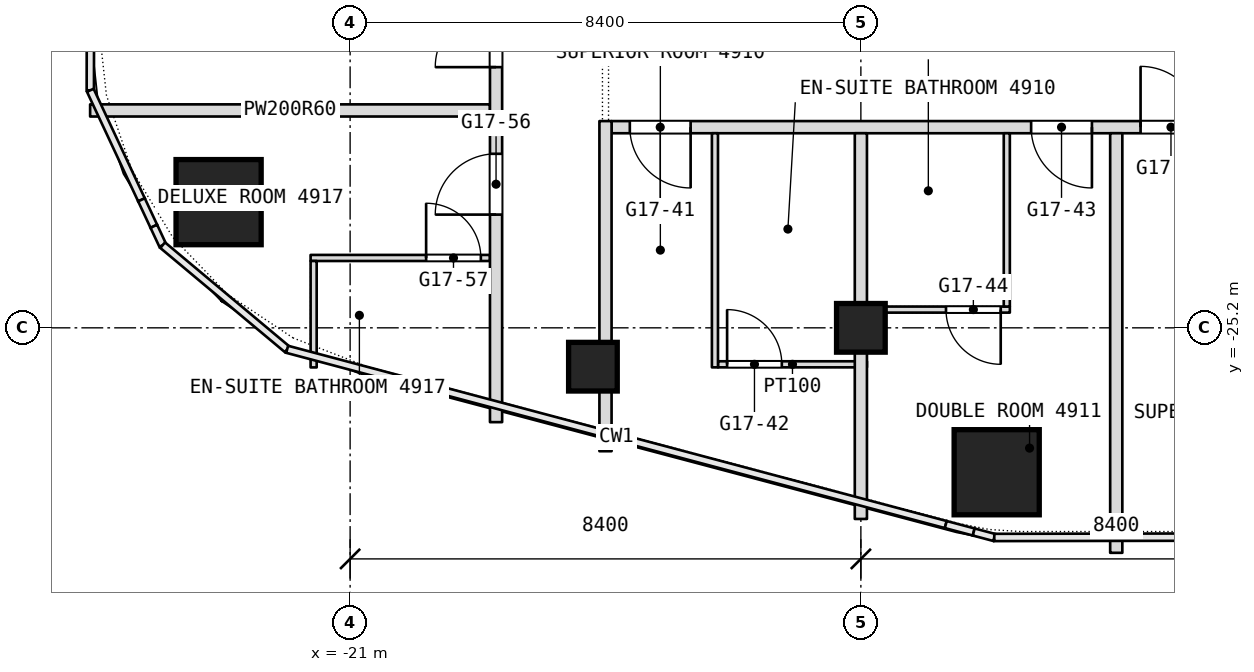
"""IFC4 building model, lengths in metres.
Left out: names, types, materials, properties, quantities, classifications, styles, units other than length and angle.
Written with IfcOpenShell. Run it as: python <this file> out.ifc"""

import sys

from ifc_helpers import new_model, si_unit, direction, frame, frame_2d, origin, origin_2d, place, context, subcontext, project, spatial, rectangle, extrude, element, fill, save


model = new_model("IFC4")
c1 = context("Model", 3, precision=1e-05, world=origin(), true_north=direction((0.0, 1.0)))
c2 = subcontext(c1, "Body", "Model", "MODEL_VIEW")
j1 = project(units=[si_unit("LENGTHUNIT", "METRE"), si_unit("PLANEANGLEUNIT", "RADIAN")], contexts=[c1])
p1 = place(None, origin())
s1 = spatial("IfcSite", under=j1, at=p1, CompositionType="ELEMENT")
p2 = place(p1, origin())
s2 = spatial("IfcBuilding", under=s1, at=p2, CompositionType="ELEMENT")
p3 = place(p2, frame((0.0, 0.0, 212.9)))
s3 = spatial("IfcBuildingStorey", under=s2, at=p3, CompositionType="ELEMENT", Elevation=212.9)
for number, where, z_axis, x_axis in (
    (1, (-23.163, -23.133, 0.0), (0.0, 0.0, 1.0), (1.0, 0.0, 0.0)),
    (2, (-10.366, -27.575, 0.0), (0.0, 0.0, 1.0), (1.0, 0.0, 0.0)),
):
    element("IfcColumn", number, at=place(p3, frame(where, z_axis=z_axis, x_axis=x_axis)), inside=s3, PredefinedType="COLUMN", context=c2, shape_type="SweptSolid", body=[
        extrude(rectangle(XDim=1.4, YDim=1.4, at=origin_2d()), origin(), (0.0, 0.0, 1.0), 3.6),
    ])
for number, where, z_axis, x_axis in (
    (3, (-12.6, -25.2, 0.0), (0.0, 0.0, 1.0), (1.0, 0.0, 0.0)),
    (4, (-17.007, -25.839, 0.0), (0.0, 0.0, 1.0), (1.0, 0.0, 0.0)),
):
    element("IfcColumn", number, at=place(p3, frame(where, z_axis=z_axis, x_axis=x_axis)), inside=s3, PredefinedType="COLUMN", context=c2, shape_type="SweptSolid", body=[
        extrude(rectangle(XDim=0.8, YDim=0.8, at=origin_2d()), origin(), (0.0, 0.0, 1.0), 3.6),
    ])
p4 = place(p3, frame((-14.95, -25.8, 0.0), z_axis=(0.0, 0.0, 1.0), x_axis=(1.0, 0.0, 0.0)))
e5 = element("IfcWall", 5, at=p4, inside=s3, PredefinedType="PARTITIONING", context=c2, shape_type="SweptSolid", body=[
    extrude(rectangle(XDim=2.45, YDim=0.1, at=frame_2d((1.225, 0.0))), origin(), (0.0, 0.0, 1.0), 3.34),
])
p5 = place(p4, frame((0.15, 0.0, 0.0)))
e6 = element("IfcOpeningElement", 6, at=p5, cuts=e5, PredefinedType="OPENING", context=c2, shape_type="SweptSolid", body=[
    extrude(rectangle(XDim=0.9, YDim=2.1, at=frame_2d((0.45, 1.05))), frame((0.0, 0.05, 0.0), z_axis=(0.0, -1.0, 0.0), x_axis=(1.0, 0.0, 0.0)), (0.0, 0.0, 1.0), 0.1),
])
p6 = place(p3, frame((-12.5, -24.9, 0.0), z_axis=(0.0, 0.0, 1.0), x_axis=(1.0, 0.0, 0.0)))
e7 = element("IfcWall", 7, at=p6, inside=s3, PredefinedType="PARTITIONING", context=c2, shape_type="SweptSolid", body=[
    extrude(rectangle(XDim=2.35, YDim=0.1, at=frame_2d((1.175, 0.0))), origin(), (0.0, 0.0, 1.0), 3.34),
])
p7 = place(p6, frame((1.3, 0.0, 0.0)))
e8 = element("IfcOpeningElement", 8, at=p7, cuts=e7, PredefinedType="OPENING", context=c2, shape_type="SweptSolid", body=[
    extrude(rectangle(XDim=0.9, YDim=2.1, at=frame_2d((0.45, 1.05))), frame((0.0, 0.05, 0.0), z_axis=(0.0, -1.0, 0.0), x_axis=(1.0, 0.0, 0.0)), (0.0, 0.0, 1.0), 0.1),
])
p8 = place(p3, frame((-21.65, -24.051, 0.0), z_axis=(0.0, 0.0, 1.0), x_axis=(1.0, 0.0, 0.0)))
e9 = element("IfcWall", 9, at=p8, inside=s3, PredefinedType="PARTITIONING", context=c2, shape_type="SweptSolid", body=[
    extrude(rectangle(XDim=2.95, YDim=0.1, at=frame_2d((1.475, 0.0))), origin(), (0.0, 0.0, 1.0), 3.34),
])
p9 = place(p8, frame((1.9, 0.0, 0.0)))
e10 = element("IfcOpeningElement", 10, at=p9, cuts=e9, PredefinedType="OPENING", context=c2, shape_type="SweptSolid", body=[
    extrude(rectangle(XDim=0.9, YDim=2.1, at=frame_2d((0.45, 1.05))), frame((0.0, 0.05, 0.0), z_axis=(0.0, -1.0, 0.0), x_axis=(1.0, 0.0, 0.0)), (0.0, 0.0, 1.0), 0.1),
])
p10 = place(p3, frame((-16.7, -21.9, 0.0), z_axis=(0.0, 0.0, 1.0), x_axis=(1.0, 0.0, 0.0)))
e11 = element("IfcWall", 11, at=p10, inside=s3, PredefinedType="PARTITIONING", context=c2, shape_type="SweptSolid", body=[
    extrude(rectangle(XDim=33.4, YDim=0.2, at=frame_2d((16.7, 0.0))), origin(), (0.0, 0.0, 1.0), 3.34),
])
p11 = place(p10, frame((0.3, 0.0, 0.0)))
e12 = element("IfcOpeningElement", 12, at=p11, cuts=e11, PredefinedType="OPENING", context=c2, shape_type="SweptSolid", body=[
    extrude(rectangle(XDim=1.0, YDim=2.1, at=frame_2d((0.5, 1.05))), frame((0.0, 0.1, 0.0), z_axis=(0.0, -1.0, 0.0), x_axis=(1.0, 0.0, 0.0)), (0.0, 0.0, 1.0), 0.2),
])
p12 = place(p10, frame((6.9, 0.0, 0.0)))
e13 = element("IfcOpeningElement", 13, at=p12, cuts=e11, PredefinedType="OPENING", context=c2, shape_type="SweptSolid", body=[
    extrude(rectangle(XDim=1.0, YDim=2.1, at=frame_2d((0.5, 1.05))), frame((0.0, 0.1, 0.0), z_axis=(0.0, -1.0, 0.0), x_axis=(1.0, 0.0, 0.0)), (0.0, 0.0, 1.0), 0.2),
])
p13 = place(p10, frame((8.7, 0.0, 0.0)))
e14 = element("IfcOpeningElement", 14, at=p13, cuts=e11, PredefinedType="OPENING", context=c2, shape_type="SweptSolid", body=[
    extrude(rectangle(XDim=1.0, YDim=2.1, at=frame_2d((0.5, 1.05))), frame((0.0, 0.1, 0.0), z_axis=(0.0, -1.0, 0.0), x_axis=(1.0, 0.0, 0.0)), (0.0, 0.0, 1.0), 0.2),
])
p14 = place(p10, frame((12.9, 0.0, 0.0)))
e15 = element("IfcOpeningElement", 15, at=p14, cuts=e11, PredefinedType="OPENING", context=c2, shape_type="SweptSolid", body=[
    extrude(rectangle(XDim=1.0, YDim=2.1, at=frame_2d((0.5, 1.05))), frame((0.0, 0.1, 0.0), z_axis=(0.0, -1.0, 0.0), x_axis=(1.0, 0.0, 0.0)), (0.0, 0.0, 1.0), 0.2),
])
p15 = place(p10, frame((19.5, 0.0, 0.0)))
e16 = element("IfcOpeningElement", 16, at=p15, cuts=e11, PredefinedType="OPENING", context=c2, shape_type="SweptSolid", body=[
    extrude(rectangle(XDim=1.0, YDim=2.1, at=frame_2d((0.5, 1.05))), frame((0.0, 0.1, 0.0), z_axis=(0.0, -1.0, 0.0), x_axis=(1.0, 0.0, 0.0)), (0.0, 0.0, 1.0), 0.2),
])
p16 = place(p10, frame((24.6, 0.0, 0.0)))
e17 = element("IfcOpeningElement", 17, at=p16, cuts=e11, PredefinedType="OPENING", context=c2, shape_type="SweptSolid", body=[
    extrude(rectangle(XDim=1.1, YDim=2.1, at=frame_2d((0.55, 1.05))), frame((0.0, 0.1, 0.0), z_axis=(0.0, -1.0, 0.0), x_axis=(1.0, 0.0, 0.0)), (0.0, 0.0, 1.0), 0.2),
])
p17 = place(p10, frame((29.7, 0.0, 0.0)))
e18 = element("IfcOpeningElement", 18, at=p17, cuts=e11, PredefinedType="OPENING", context=c2, shape_type="SweptSolid", body=[
    extrude(rectangle(XDim=1.0, YDim=2.1, at=frame_2d((0.5, 1.05))), frame((0.0, 0.1, 0.0), z_axis=(0.0, -1.0, 0.0), x_axis=(1.0, 0.0, 0.0)), (0.0, 0.0, 1.0), 0.2),
])
p18 = place(p3, frame((-25.276, -21.625, 0.0), z_axis=(0.0, 0.0, 1.0), x_axis=(1.0, 0.0, 0.0)))
e19 = element("IfcWall", 19, at=p18, inside=s3, PredefinedType="PARTITIONING", context=c2, shape_type="SweptSolid", body=[
    extrude(rectangle(XDim=6.576, YDim=0.2, at=frame_2d((3.288, 0.0))), origin(), (0.0, 0.0, 1.0), 3.34),
])
p19 = place(p3, frame((-8.4, -28.9, 0.0), z_axis=(0.0, 0.0, 1.0), x_axis=(0.0, 1.0, 0.0)))
e20 = element("IfcWall", 20, at=p19, inside=s3, PredefinedType="PARTITIONING", context=c2, shape_type="SweptSolid", body=[
    extrude(rectangle(XDim=6.9, YDim=0.2, at=frame_2d((3.45, 0.0))), origin(), (0.0, 0.0, 1.0), 3.34),
])
p20 = place(p3, frame((-10.2, -24.85, 0.0), z_axis=(0.0, 0.0, 1.0), x_axis=(0.0, 1.0, 0.0)))
e21 = element("IfcWall", 21, at=p20, inside=s3, PredefinedType="PARTITIONING", context=c2, shape_type="SweptSolid", body=[
    extrude(rectangle(XDim=2.85, YDim=0.1, at=frame_2d((1.425, 0.0))), origin(), (0.0, 0.0, 1.0), 3.34),
])
p21 = place(p3, frame((-12.6, -28.343, 0.0), z_axis=(0.0, 0.0, 1.0), x_axis=(0.0, 1.0, 0.0)))
e22 = element("IfcWall", 22, at=p21, inside=s3, PredefinedType="PARTITIONING", context=c2, shape_type="SweptSolid", body=[
    extrude(rectangle(XDim=6.343, YDim=0.2, at=frame_2d((3.171, 0.0))), origin(), (0.0, 0.0, 1.0), 3.34),
])
p22 = place(p3, frame((-15.0, -25.85, 0.0), z_axis=(0.0, 0.0, 1.0), x_axis=(0.0, 1.0, 0.0)))
e23 = element("IfcWall", 23, at=p22, inside=s3, PredefinedType="PARTITIONING", context=c2, shape_type="SweptSolid", body=[
    extrude(rectangle(XDim=3.85, YDim=0.1, at=frame_2d((1.925, 0.0))), origin(), (0.0, 0.0, 1.0), 3.34),
])
p23 = place(p3, frame((-16.8, -27.229, 0.0), z_axis=(0.0, 0.0, 1.0), x_axis=(0.0, 1.0, 0.0)))
e24 = element("IfcWall", 24, at=p23, inside=s3, PredefinedType="PARTITIONING", context=c2, shape_type="SweptSolid", body=[
    extrude(rectangle(XDim=5.429, YDim=0.2, at=frame_2d((2.714, 0.0))), origin(), (0.0, 0.0, 1.0), 3.34),
])
p24 = place(p3, frame((-18.6, -26.751, 0.0), z_axis=(0.0, 0.0, 1.0), x_axis=(0.0, 1.0, 0.0)))
e25 = element("IfcWall", 25, at=p24, inside=s3, PredefinedType="PARTITIONING", context=c2, shape_type="SweptSolid", body=[
    extrude(rectangle(XDim=49.091, YDim=0.2, at=frame_2d((24.545, 0.0))), origin(), (0.0, 0.0, 1.0), 3.34),
])
p25 = place(p24, frame((3.413, 0.0, 0.0)))
e26 = element("IfcOpeningElement", 26, at=p25, cuts=e25, PredefinedType="OPENING", context=c2, shape_type="SweptSolid", body=[
    extrude(rectangle(XDim=1.0, YDim=2.1, at=frame_2d((0.5, 1.05))), frame((0.0, 0.1, 0.0), z_axis=(0.0, -1.0, 0.0), x_axis=(1.0, 0.0, 0.0)), (0.0, 0.0, 1.0), 0.2),
])
p26 = place(p24, frame((5.838, 0.0, 0.0)))
e27 = element("IfcOpeningElement", 27, at=p26, cuts=e25, PredefinedType="OPENING", context=c2, shape_type="SweptSolid", body=[
    extrude(rectangle(XDim=1.0, YDim=2.1, at=frame_2d((0.5, 1.05))), frame((0.0, 0.1, 0.0), z_axis=(0.0, -1.0, 0.0), x_axis=(1.0, 0.0, 0.0)), (0.0, 0.0, 1.0), 0.2),
])
p27 = place(p24, frame((13.551, 0.0, 0.0)))
e28 = element("IfcOpeningElement", 28, at=p27, cuts=e25, PredefinedType="OPENING", context=c2, shape_type="SweptSolid", body=[
    extrude(rectangle(XDim=1.1, YDim=2.1, at=frame_2d((0.55, 1.05))), frame((0.0, 0.1, 0.0), z_axis=(0.0, -1.0, 0.0), x_axis=(1.0, 0.0, 0.0)), (0.0, 0.0, 1.0), 0.2),
])
p28 = place(p24, frame((21.151, 0.0, 0.0)))
e29 = element("IfcOpeningElement", 29, at=p28, cuts=e25, PredefinedType="OPENING", context=c2, shape_type="SweptSolid", body=[
    extrude(rectangle(XDim=1.0, YDim=2.1, at=frame_2d((0.5, 1.05))), frame((0.0, 0.1, 0.0), z_axis=(0.0, -1.0, 0.0), x_axis=(1.0, 0.0, 0.0)), (0.0, 0.0, 1.0), 0.2),
])
p29 = place(p24, frame((22.951, 0.0, 0.0)))
e30 = element("IfcOpeningElement", 30, at=p29, cuts=e25, PredefinedType="OPENING", context=c2, shape_type="SweptSolid", body=[
    extrude(rectangle(XDim=1.0, YDim=2.1, at=frame_2d((0.5, 1.05))), frame((0.0, 0.1, 0.0), z_axis=(0.0, -1.0, 0.0), x_axis=(1.0, 0.0, 0.0)), (0.0, 0.0, 1.0), 0.2),
])
p30 = place(p24, frame((28.301, 0.0, 0.0)))
e31 = element("IfcOpeningElement", 31, at=p30, cuts=e25, PredefinedType="OPENING", context=c2, shape_type="SweptSolid", body=[
    extrude(rectangle(XDim=1.1, YDim=2.1, at=frame_2d((0.55, 1.05))), frame((0.0, 0.1, 0.0), z_axis=(0.0, -1.0, 0.0), x_axis=(1.0, 0.0, 0.0)), (0.0, 0.0, 1.0), 0.2),
])
p31 = place(p24, frame((38.851, 0.0, 0.0)))
e32 = element("IfcOpeningElement", 32, at=p31, cuts=e25, PredefinedType="OPENING", context=c2, shape_type="SweptSolid", body=[
    extrude(rectangle(XDim=1.1, YDim=2.1, at=frame_2d((0.55, 1.05))), frame((0.0, 0.1, 0.0), z_axis=(0.0, -1.0, 0.0), x_axis=(1.0, 0.0, 0.0)), (0.0, 0.0, 1.0), 0.2),
])
p32 = place(p24, frame((44.051, 0.0, 0.0)))
e33 = element("IfcOpeningElement", 33, at=p32, cuts=e25, PredefinedType="OPENING", context=c2, shape_type="SweptSolid", body=[
    extrude(rectangle(XDim=1.0, YDim=2.1, at=frame_2d((0.5, 1.05))), frame((0.0, 0.1, 0.0), z_axis=(0.0, -1.0, 0.0), x_axis=(1.0, 0.0, 0.0)), (0.0, 0.0, 1.0), 0.2),
])
p33 = place(p3, frame((-21.6, -25.851, 0.0), z_axis=(0.0, 0.0, 1.0), x_axis=(0.0, 1.0, 0.0)))
e34 = element("IfcWall", 34, at=p33, inside=s3, PredefinedType="PARTITIONING", context=c2, shape_type="SweptSolid", body=[
    extrude(rectangle(XDim=1.75, YDim=0.1, at=frame_2d((0.875, 0.0))), origin(), (0.0, 0.0, 1.0), 3.34),
])
p34 = place(p5, origin())
e35 = element("IfcDoor", 35, at=p34, inside=s3, OperationType="SINGLE_SWING_LEFT", PredefinedType="DOOR", context=c2, shape_type="SweptSolid", body=[
    extrude(rectangle(XDim=0.9, YDim=2.1, at=frame_2d((0.45, 1.05))), frame((0.0, 0.025, 0.0), z_axis=(0.0, -1.0, 0.0), x_axis=(1.0, 0.0, 0.0)), (0.0, 0.0, 1.0), 0.05),
])
fill(e6, e35)
p35 = place(p7, origin())
e36 = element("IfcDoor", 36, at=p35, inside=s3, OperationType="SINGLE_SWING_RIGHT", PredefinedType="DOOR", context=c2, shape_type="SweptSolid", body=[
    extrude(rectangle(XDim=0.9, YDim=2.1, at=frame_2d((0.45, 1.05))), frame((0.0, 0.025, 0.0), z_axis=(0.0, -1.0, 0.0), x_axis=(1.0, 0.0, 0.0)), (0.0, 0.0, 1.0), 0.05),
])
fill(e8, e36)
p36 = place(p9, origin())
e37 = element("IfcDoor", 37, at=p36, inside=s3, OperationType="SINGLE_SWING_LEFT", PredefinedType="DOOR", context=c2, shape_type="SweptSolid", body=[
    extrude(rectangle(XDim=0.9, YDim=2.1, at=frame_2d((0.45, 1.05))), frame((0.0, 0.025, 0.0), z_axis=(0.0, -1.0, 0.0), x_axis=(1.0, 0.0, 0.0)), (0.0, 0.0, 1.0), 0.05),
])
fill(e10, e37)
p37 = place(p11, origin())
e38 = element("IfcDoor", 38, at=p37, inside=s3, OperationType="SINGLE_SWING_RIGHT", PredefinedType="DOOR", context=c2, shape_type="SweptSolid", body=[
    extrude(rectangle(XDim=1.0, YDim=2.1, at=frame_2d((0.5, 1.05))), frame((0.0, 0.025, 0.0), z_axis=(0.0, -1.0, 0.0), x_axis=(1.0, 0.0, 0.0)), (0.0, 0.0, 1.0), 0.05),
])
fill(e12, e38)
p38 = place(p12, origin())
e39 = element("IfcDoor", 39, at=p38, inside=s3, OperationType="SINGLE_SWING_LEFT", PredefinedType="DOOR", context=c2, shape_type="SweptSolid", body=[
    extrude(rectangle(XDim=1.0, YDim=2.1, at=frame_2d((0.5, 1.05))), frame((0.0, 0.025, 0.0), z_axis=(0.0, -1.0, 0.0), x_axis=(1.0, 0.0, 0.0)), (0.0, 0.0, 1.0), 0.05),
])
fill(e13, e39)
p39 = place(p13, origin())
e40 = element("IfcDoor", 40, at=p39, inside=s3, OperationType="SINGLE_SWING_LEFT", PredefinedType="DOOR", context=c2, shape_type="SweptSolid", body=[
    extrude(rectangle(XDim=1.0, YDim=2.1, at=frame_2d((0.5, 1.05))), frame((0.0, 0.025, 0.0), z_axis=(0.0, -1.0, 0.0), x_axis=(1.0, 0.0, 0.0)), (0.0, 0.0, 1.0), 0.05),
])
fill(e14, e40)
p40 = place(p25, origin())
e41 = element("IfcDoor", 41, at=p40, inside=s3, OperationType="SINGLE_SWING_LEFT", PredefinedType="DOOR", context=c2, shape_type="SweptSolid", body=[
    extrude(rectangle(XDim=1.0, YDim=2.1, at=frame_2d((0.5, 1.05))), frame((0.0, 0.025, 0.0), z_axis=(0.0, -1.0, 0.0), x_axis=(1.0, 0.0, 0.0)), (0.0, 0.0, 1.0), 0.05),
])
fill(e26, e41)
p41 = place(p26, origin())
e42 = element("IfcDoor", 42, at=p41, inside=s3, OperationType="SINGLE_SWING_LEFT", PredefinedType="DOOR", context=c2, shape_type="SweptSolid", body=[
    extrude(rectangle(XDim=1.0, YDim=2.1, at=frame_2d((0.5, 1.05))), frame((0.0, 0.025, 0.0), z_axis=(0.0, -1.0, 0.0), x_axis=(1.0, 0.0, 0.0)), (0.0, 0.0, 1.0), 0.05),
])
fill(e27, e42)
save(model, sys.argv[1])
